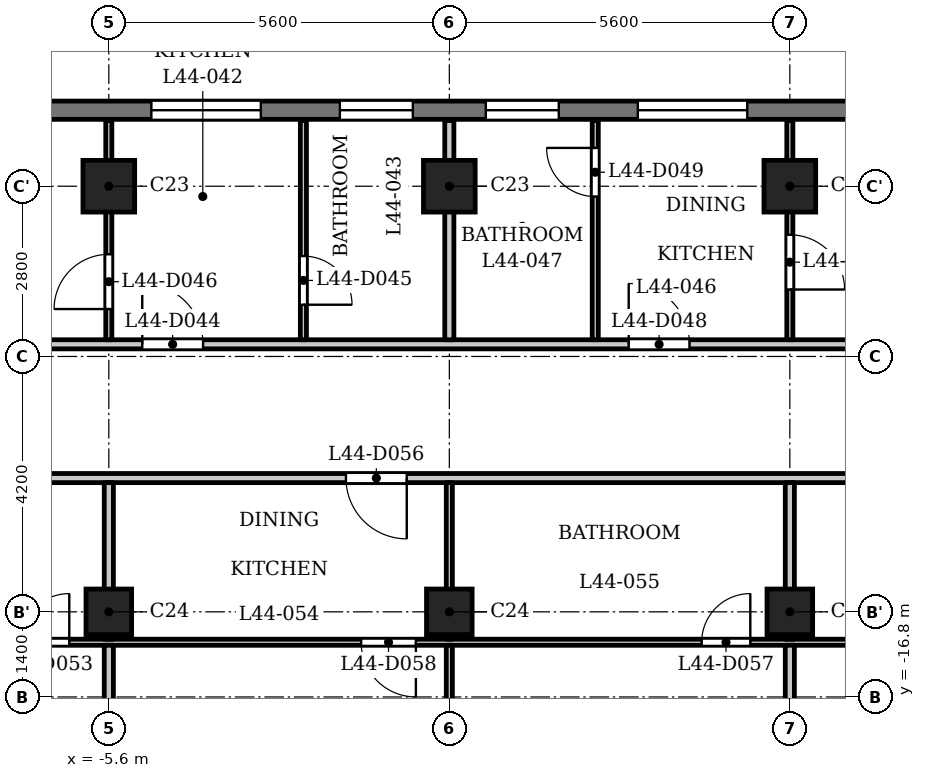
"""IFC4 building model, lengths in metres.
Left out: names, types, materials, properties, quantities, classifications, styles, units other than length and angle.
Written with IfcOpenShell. Run it as: python <this file> out.ifc"""

import sys

from ifc_helpers import new_model, si_unit, direction, frame, frame_2d, origin, origin_2d, place, context, subcontext, project, spatial, rectangle, extrude, element, fill, save


model = new_model("IFC4")
c1 = context("Model", 3, precision=1e-05, world=origin(), true_north=direction((0.0, 1.0)))
c2 = subcontext(c1, "Body", "Model", "MODEL_VIEW")
j1 = project(units=[si_unit("LENGTHUNIT", "METRE"), si_unit("PLANEANGLEUNIT", "RADIAN")], contexts=[c1])
p1 = place(None, origin())
s1 = spatial("IfcSite", under=j1, at=p1, CompositionType="ELEMENT")
p2 = place(p1, origin())
s2 = spatial("IfcBuilding", under=s1, at=p2, CompositionType="ELEMENT")
p3 = place(p2, frame((0.0, 0.0, 171.1)))
s3 = spatial("IfcBuildingStorey", under=s2, at=p3, CompositionType="ELEMENT", Elevation=171.1)
for number, where, z_axis, x_axis in (
    (1, (-5.6, -8.4, 0.0), (0.0, 0.0, 1.0), (1.0, 0.0, 0.0)),
    (2, (0.0, -8.4, 0.0), (0.0, 0.0, 1.0), (1.0, 0.0, 0.0)),
    (3, (5.6, -8.4, 0.0), (0.0, 0.0, 1.0), (1.0, 0.0, 0.0)),
):
    element("IfcColumn", number, at=place(p3, frame(where, z_axis=z_axis, x_axis=x_axis)), inside=s3, PredefinedType="COLUMN", context=c2, shape_type="SweptSolid", body=[
        extrude(rectangle(XDim=0.85, YDim=0.85, at=origin_2d()), origin(), (0.0, 0.0, 1.0), 3.5),
    ])
for number, where, z_axis, x_axis in (
    (4, (-5.6, -15.4, 0.0), (0.0, 0.0, 1.0), (1.0, 0.0, 0.0)),
    (5, (0.0, -15.4, 0.0), (0.0, 0.0, 1.0), (1.0, 0.0, 0.0)),
    (6, (5.6, -15.4, 0.0), (0.0, 0.0, 1.0), (1.0, 0.0, 0.0)),
):
    element("IfcColumn", number, at=place(p3, frame(where, z_axis=z_axis, x_axis=x_axis)), inside=s3, PredefinedType="COLUMN", context=c2, shape_type="SweptSolid", body=[
        extrude(rectangle(XDim=0.75, YDim=0.75, at=origin_2d()), origin(), (0.0, 0.0, 1.0), 3.5),
    ])
p4 = place(p3, frame((13.8, -7.15, 0.0), z_axis=(0.0, 0.0, 1.0), x_axis=(-1.0, 0.0, 0.0)))
e7 = element("IfcWall", 7, at=p4, inside=s3, PredefinedType="SOLIDWALL", context=c2, shape_type="SweptSolid", body=[
    extrude(rectangle(XDim=27.6, YDim=0.3, at=frame_2d((13.8, 0.0))), origin(), (0.0, 0.0, 1.0), 3.2),
])
p5 = place(p4, frame((0.363, 0.0, 0.9)))
e8 = element("IfcOpeningElement", 8, at=p5, cuts=e7, PredefinedType="OPENING", context=c2, shape_type="SweptSolid", body=[
    extrude(rectangle(XDim=1.8, YDim=1.25, at=frame_2d((0.9, 0.625))), frame((0.0, 0.16, 0.0), z_axis=(0.0, -1.0, 0.0), x_axis=(1.0, 0.0, 0.0)), (0.0, 0.0, 1.0), 0.32),
])
p6 = place(p4, frame((3.6, 0.0, 1.2)))
e9 = element("IfcOpeningElement", 9, at=p6, cuts=e7, PredefinedType="OPENING", context=c2, shape_type="SweptSolid", body=[
    extrude(rectangle(XDim=3.6, YDim=0.95, at=frame_2d((1.8, 0.475))), frame((0.0, 0.16, 0.0), z_axis=(0.0, -1.0, 0.0), x_axis=(1.0, 0.0, 0.0)), (0.0, 0.0, 1.0), 0.32),
])
p7 = place(p4, frame((8.9, 0.0, 0.9)))
e10 = element("IfcOpeningElement", 10, at=p7, cuts=e7, PredefinedType="OPENING", context=c2, shape_type="SweptSolid", body=[
    extrude(rectangle(XDim=1.8, YDim=1.25, at=frame_2d((0.9, 0.625))), frame((0.0, 0.16, 0.0), z_axis=(0.0, -1.0, 0.0), x_axis=(1.0, 0.0, 0.0)), (0.0, 0.0, 1.0), 0.32),
])
p8 = place(p4, frame((12.0, 0.0, 0.6)))
e11 = element("IfcOpeningElement", 11, at=p8, cuts=e7, PredefinedType="OPENING", context=c2, shape_type="SweptSolid", body=[
    extrude(rectangle(XDim=1.2, YDim=1.55, at=frame_2d((0.6, 0.775))), frame((0.0, 0.16, 0.0), z_axis=(0.0, -1.0, 0.0), x_axis=(1.0, 0.0, 0.0)), (0.0, 0.0, 1.0), 0.32),
])
p9 = place(p4, frame((14.4, 0.0, 0.6)))
e12 = element("IfcOpeningElement", 12, at=p9, cuts=e7, PredefinedType="OPENING", context=c2, shape_type="SweptSolid", body=[
    extrude(rectangle(XDim=1.2, YDim=1.55, at=frame_2d((0.6, 0.775))), frame((0.0, 0.16, 0.0), z_axis=(0.0, -1.0, 0.0), x_axis=(1.0, 0.0, 0.0)), (0.0, 0.0, 1.0), 0.32),
])
p10 = place(p4, frame((16.9, 0.0, 0.9)))
e13 = element("IfcOpeningElement", 13, at=p10, cuts=e7, PredefinedType="OPENING", context=c2, shape_type="SweptSolid", body=[
    extrude(rectangle(XDim=1.8, YDim=1.25, at=frame_2d((0.9, 0.625))), frame((0.0, 0.16, 0.0), z_axis=(0.0, -1.0, 0.0), x_axis=(1.0, 0.0, 0.0)), (0.0, 0.0, 1.0), 0.32),
])
p11 = place(p4, frame((20.4, 0.0, 1.2)))
e14 = element("IfcOpeningElement", 14, at=p11, cuts=e7, PredefinedType="OPENING", context=c2, shape_type="SweptSolid", body=[
    extrude(rectangle(XDim=3.6, YDim=0.95, at=frame_2d((1.8, 0.475))), frame((0.0, 0.16, 0.0), z_axis=(0.0, -1.0, 0.0), x_axis=(1.0, 0.0, 0.0)), (0.0, 0.0, 1.0), 0.32),
])
p12 = place(p4, frame((25.438, 0.0, 0.9)))
e15 = element("IfcOpeningElement", 15, at=p12, cuts=e7, PredefinedType="OPENING", context=c2, shape_type="SweptSolid", body=[
    extrude(rectangle(XDim=1.8, YDim=1.25, at=frame_2d((0.9, 0.625))), frame((0.0, 0.16, 0.0), z_axis=(0.0, -1.0, 0.0), x_axis=(1.0, 0.0, 0.0)), (0.0, 0.0, 1.0), 0.32),
])
p13 = place(p3, frame((-16.725, -15.9, 0.0), z_axis=(0.0, 0.0, 1.0), x_axis=(1.0, 0.0, 0.0)))
e16 = element("IfcWall", 16, at=p13, inside=s3, PredefinedType="PARTITIONING", context=c2, shape_type="SweptSolid", body=[
    extrude(rectangle(XDim=33.45, YDim=0.1, at=frame_2d((16.725, 0.0))), origin(), (0.0, 0.0, 1.0), 3.2),
])
p14 = place(p13, frame((9.675, 0.0, 0.0)))
e17 = element("IfcOpeningElement", 17, at=p14, cuts=e16, PredefinedType="OPENING", context=c2, shape_type="SweptSolid", body=[
    extrude(rectangle(XDim=0.8, YDim=2.1, at=frame_2d((0.4, 1.05))), frame((0.0, 0.06, 0.0), z_axis=(0.0, -1.0, 0.0), x_axis=(1.0, 0.0, 0.0)), (0.0, 0.0, 1.0), 0.12),
])
p15 = place(p13, frame((4.075, 0.0, 0.0)))
e18 = element("IfcOpeningElement", 18, at=p15, cuts=e16, PredefinedType="OPENING", context=c2, shape_type="SweptSolid", body=[
    extrude(rectangle(XDim=0.9, YDim=2.1, at=frame_2d((0.45, 1.05))), frame((0.0, 0.06, 0.0), z_axis=(0.0, -1.0, 0.0), x_axis=(1.0, 0.0, 0.0)), (0.0, 0.0, 1.0), 0.12),
])
p16 = place(p13, frame((20.875, 0.0, 0.0)))
e19 = element("IfcOpeningElement", 19, at=p16, cuts=e16, PredefinedType="OPENING", context=c2, shape_type="SweptSolid", body=[
    extrude(rectangle(XDim=0.8, YDim=2.1, at=frame_2d((0.4, 1.05))), frame((0.0, 0.06, 0.0), z_axis=(0.0, -1.0, 0.0), x_axis=(1.0, 0.0, 0.0)), (0.0, 0.0, 1.0), 0.12),
])
p17 = place(p13, frame((15.275, 0.0, 0.0)))
e20 = element("IfcOpeningElement", 20, at=p17, cuts=e16, PredefinedType="OPENING", context=c2, shape_type="SweptSolid", body=[
    extrude(rectangle(XDim=0.9, YDim=2.1, at=frame_2d((0.45, 1.05))), frame((0.0, 0.06, 0.0), z_axis=(0.0, -1.0, 0.0), x_axis=(1.0, 0.0, 0.0)), (0.0, 0.0, 1.0), 0.12),
])
p18 = place(p13, frame((30.825, 0.0, 0.0)))
e21 = element("IfcOpeningElement", 21, at=p18, cuts=e16, PredefinedType="OPENING", context=c2, shape_type="SweptSolid", body=[
    extrude(rectangle(XDim=0.8, YDim=2.1, at=frame_2d((0.4, 1.05))), frame((0.0, 0.06, 0.0), z_axis=(0.0, -1.0, 0.0), x_axis=(1.0, 0.0, 0.0)), (0.0, 0.0, 1.0), 0.12),
])
p19 = place(p13, frame((26.475, 0.0, 0.0)))
e22 = element("IfcOpeningElement", 22, at=p19, cuts=e16, PredefinedType="OPENING", context=c2, shape_type="SweptSolid", body=[
    extrude(rectangle(XDim=0.9, YDim=2.1, at=frame_2d((0.45, 1.05))), frame((0.0, 0.06, 0.0), z_axis=(0.0, -1.0, 0.0), x_axis=(1.0, 0.0, 0.0)), (0.0, 0.0, 1.0), 0.12),
])
p20 = place(p3, frame((-17.4, -13.2, 0.0), z_axis=(0.0, 0.0, 1.0), x_axis=(1.0, 0.0, 0.0)))
e23 = element("IfcWall", 23, at=p20, inside=s3, PredefinedType="PARTITIONING", context=c2, shape_type="SweptSolid", body=[
    extrude(rectangle(XDim=34.8, YDim=0.15, at=frame_2d((17.4, 0.0))), origin(), (0.0, 0.0, 1.0), 3.2),
])
p21 = place(p20, frame((0.15, 0.0, 0.0)))
e24 = element("IfcOpeningElement", 24, at=p21, cuts=e23, PredefinedType="OPENING", context=c2, shape_type="SweptSolid", body=[
    extrude(rectangle(XDim=1.0, YDim=2.1, at=frame_2d((0.5, 1.05))), frame((0.0, 0.085, 0.0), z_axis=(0.0, -1.0, 0.0), x_axis=(1.0, 0.0, 0.0)), (0.0, 0.0, 1.0), 0.17),
])
p22 = place(p20, frame((33.55, 0.0, 0.0)))
e25 = element("IfcOpeningElement", 25, at=p22, cuts=e23, PredefinedType="OPENING", context=c2, shape_type="SweptSolid", body=[
    extrude(rectangle(XDim=1.0, YDim=2.1, at=frame_2d((0.5, 1.05))), frame((0.0, 0.085, 0.0), z_axis=(0.0, -1.0, 0.0), x_axis=(1.0, 0.0, 0.0)), (0.0, 0.0, 1.0), 0.17),
])
p23 = place(p20, frame((15.7, 0.0, 0.0)))
e26 = element("IfcOpeningElement", 26, at=p23, cuts=e23, PredefinedType="OPENING", context=c2, shape_type="SweptSolid", body=[
    extrude(rectangle(XDim=1.0, YDim=2.1, at=frame_2d((0.5, 1.05))), frame((0.0, 0.085, 0.0), z_axis=(0.0, -1.0, 0.0), x_axis=(1.0, 0.0, 0.0)), (0.0, 0.0, 1.0), 0.17),
])
p24 = place(p20, frame((26.9, 0.0, 0.0)))
e27 = element("IfcOpeningElement", 27, at=p24, cuts=e23, PredefinedType="OPENING", context=c2, shape_type="SweptSolid", body=[
    extrude(rectangle(XDim=1.0, YDim=2.1, at=frame_2d((0.5, 1.05))), frame((0.0, 0.085, 0.0), z_axis=(0.0, -1.0, 0.0), x_axis=(1.0, 0.0, 0.0)), (0.0, 0.0, 1.0), 0.17),
])
p25 = place(p3, frame((-14.925, -11.0, 0.0), z_axis=(0.0, 0.0, 1.0), x_axis=(1.0, 0.0, 0.0)))
e28 = element("IfcWall", 28, at=p25, inside=s3, PredefinedType="PARTITIONING", context=c2, shape_type="SweptSolid", body=[
    extrude(rectangle(XDim=29.85, YDim=0.15, at=frame_2d((14.925, 0.0))), origin(), (0.0, 0.0, 1.0), 3.2),
])
p26 = place(p25, frame((9.875, 0.0, 0.0)))
e29 = element("IfcOpeningElement", 29, at=p26, cuts=e28, PredefinedType="OPENING", context=c2, shape_type="SweptSolid", body=[
    extrude(rectangle(XDim=1.0, YDim=2.1, at=frame_2d((0.5, 1.05))), frame((0.0, 0.085, 0.0), z_axis=(0.0, -1.0, 0.0), x_axis=(1.0, 0.0, 0.0)), (0.0, 0.0, 1.0), 0.17),
])
p27 = place(p25, frame((17.875, 0.0, 0.0)))
e30 = element("IfcOpeningElement", 30, at=p27, cuts=e28, PredefinedType="OPENING", context=c2, shape_type="SweptSolid", body=[
    extrude(rectangle(XDim=1.0, YDim=2.1, at=frame_2d((0.5, 1.05))), frame((0.0, 0.085, 0.0), z_axis=(0.0, -1.0, 0.0), x_axis=(1.0, 0.0, 0.0)), (0.0, 0.0, 1.0), 0.17),
])
p28 = place(p3, frame((-5.6, -10.925, 0.0), z_axis=(0.0, 0.0, 1.0), x_axis=(0.0, 1.0, 0.0)))
e31 = element("IfcWall", 31, at=p28, inside=s3, PredefinedType="PARTITIONING", context=c2, shape_type="SweptSolid", body=[
    extrude(rectangle(XDim=3.605, YDim=0.1, at=frame_2d((1.802, 0.0))), origin(), (0.0, 0.0, 1.0), 3.2),
])
p29 = place(p28, frame((0.505, 0.0, 0.0)))
e32 = element("IfcOpeningElement", 32, at=p29, cuts=e31, PredefinedType="OPENING", context=c2, shape_type="SweptSolid", body=[
    extrude(rectangle(XDim=0.9, YDim=2.1, at=frame_2d((0.45, 1.05))), frame((0.0, 0.06, 0.0), z_axis=(0.0, -1.0, 0.0), x_axis=(1.0, 0.0, 0.0)), (0.0, 0.0, 1.0), 0.12),
])
p30 = place(p3, frame((-5.6, -22.88, 0.0), z_axis=(0.0, 0.0, 1.0), x_axis=(0.0, 1.0, 0.0)))
e33 = element("IfcWall", 33, at=p30, inside=s3, PredefinedType="PARTITIONING", context=c2, shape_type="SweptSolid", body=[
    extrude(rectangle(XDim=6.93, YDim=0.15, at=frame_2d((3.465, 0.0))), origin(), (0.0, 0.0, 1.0), 3.2),
])
p31 = place(p3, frame((-5.6, -15.85, 0.0), z_axis=(0.0, 0.0, 1.0), x_axis=(0.0, 1.0, 0.0)))
e34 = element("IfcWall", 34, at=p31, inside=s3, PredefinedType="PARTITIONING", context=c2, shape_type="SweptSolid", body=[
    extrude(rectangle(XDim=2.575, YDim=0.15, at=frame_2d((1.288, 0.0))), origin(), (0.0, 0.0, 1.0), 3.2),
])
p32 = place(p3, frame((-2.4, -10.925, 0.0), z_axis=(0.0, 0.0, 1.0), x_axis=(0.0, 1.0, 0.0)))
e35 = element("IfcWall", 35, at=p32, inside=s3, PredefinedType="PARTITIONING", context=c2, shape_type="SweptSolid", body=[
    extrude(rectangle(XDim=3.605, YDim=0.1, at=frame_2d((1.802, 0.0))), origin(), (0.0, 0.0, 1.0), 3.2),
])
p33 = place(p32, frame((0.576, 0.0, 0.0)))
e36 = element("IfcOpeningElement", 36, at=p33, cuts=e35, PredefinedType="OPENING", context=c2, shape_type="SweptSolid", body=[
    extrude(rectangle(XDim=0.8, YDim=2.1, at=frame_2d((0.4, 1.05))), frame((0.0, 0.06, 0.0), z_axis=(0.0, -1.0, 0.0), x_axis=(1.0, 0.0, 0.0)), (0.0, 0.0, 1.0), 0.12),
])
p34 = place(p3, frame((0.0, -22.88, 0.0), z_axis=(0.0, 0.0, 1.0), x_axis=(0.0, 1.0, 0.0)))
e37 = element("IfcWall", 37, at=p34, inside=s3, PredefinedType="PARTITIONING", context=c2, shape_type="SweptSolid", body=[
    extrude(rectangle(XDim=6.93, YDim=0.1, at=frame_2d((3.465, 0.0))), origin(), (0.0, 0.0, 1.0), 3.2),
])
p35 = place(p34, frame((1.22, 0.0, 0.0)))
e38 = element("IfcOpeningElement", 38, at=p35, cuts=e37, PredefinedType="OPENING", context=c2, shape_type="SweptSolid", body=[
    extrude(rectangle(XDim=0.9, YDim=2.1, at=frame_2d((0.45, 1.05))), frame((0.0, 0.06, 0.0), z_axis=(0.0, -1.0, 0.0), x_axis=(1.0, 0.0, 0.0)), (0.0, 0.0, 1.0), 0.12),
])
p36 = place(p3, frame((0.0, -15.85, 0.0), z_axis=(0.0, 0.0, 1.0), x_axis=(0.0, 1.0, 0.0)))
e39 = element("IfcWall", 39, at=p36, inside=s3, PredefinedType="PARTITIONING", context=c2, shape_type="SweptSolid", body=[
    extrude(rectangle(XDim=2.575, YDim=0.1, at=frame_2d((1.288, 0.0))), origin(), (0.0, 0.0, 1.0), 3.2),
])
p37 = place(p3, frame((0.0, -10.925, 0.0), z_axis=(0.0, 0.0, 1.0), x_axis=(0.0, 1.0, 0.0)))
e40 = element("IfcWall", 40, at=p37, inside=s3, PredefinedType="PARTITIONING", context=c2, shape_type="SweptSolid", body=[
    extrude(rectangle(XDim=3.605, YDim=0.15, at=frame_2d((1.802, 0.0))), origin(), (0.0, 0.0, 1.0), 3.2),
])
p38 = place(p3, frame((2.4, -10.925, 0.0), z_axis=(0.0, 0.0, 1.0), x_axis=(0.0, 1.0, 0.0)))
e41 = element("IfcWall", 41, at=p38, inside=s3, PredefinedType="PARTITIONING", context=c2, shape_type="SweptSolid", body=[
    extrude(rectangle(XDim=3.605, YDim=0.1, at=frame_2d((1.802, 0.0))), origin(), (0.0, 0.0, 1.0), 3.2),
])
p39 = place(p38, frame((2.355, 0.0, 0.0)))
e42 = element("IfcOpeningElement", 42, at=p39, cuts=e41, PredefinedType="OPENING", context=c2, shape_type="SweptSolid", body=[
    extrude(rectangle(XDim=0.8, YDim=2.1, at=frame_2d((0.4, 1.05))), frame((0.0, 0.06, 0.0), z_axis=(0.0, -1.0, 0.0), x_axis=(1.0, 0.0, 0.0)), (0.0, 0.0, 1.0), 0.12),
])
p40 = place(p3, frame((5.6, -10.925, 0.0), z_axis=(0.0, 0.0, 1.0), x_axis=(0.0, 1.0, 0.0)))
e43 = element("IfcWall", 43, at=p40, inside=s3, PredefinedType="PARTITIONING", context=c2, shape_type="SweptSolid", body=[
    extrude(rectangle(XDim=3.605, YDim=0.1, at=frame_2d((1.802, 0.0))), origin(), (0.0, 0.0, 1.0), 3.2),
])
p41 = place(p40, frame((0.826, 0.0, 0.0)))
e44 = element("IfcOpeningElement", 44, at=p41, cuts=e43, PredefinedType="OPENING", context=c2, shape_type="SweptSolid", body=[
    extrude(rectangle(XDim=0.9, YDim=2.1, at=frame_2d((0.45, 1.05))), frame((0.0, 0.06, 0.0), z_axis=(0.0, -1.0, 0.0), x_axis=(1.0, 0.0, 0.0)), (0.0, 0.0, 1.0), 0.12),
])
p42 = place(p3, frame((5.6, -22.88, 0.0), z_axis=(0.0, 0.0, 1.0), x_axis=(0.0, 1.0, 0.0)))
e45 = element("IfcWall", 45, at=p42, inside=s3, PredefinedType="PARTITIONING", context=c2, shape_type="SweptSolid", body=[
    extrude(rectangle(XDim=6.93, YDim=0.15, at=frame_2d((3.465, 0.0))), origin(), (0.0, 0.0, 1.0), 3.2),
])
p43 = place(p3, frame((5.6, -15.85, 0.0), z_axis=(0.0, 0.0, 1.0), x_axis=(0.0, 1.0, 0.0)))
e46 = element("IfcWall", 46, at=p43, inside=s3, PredefinedType="PARTITIONING", context=c2, shape_type="SweptSolid", body=[
    extrude(rectangle(XDim=2.575, YDim=0.15, at=frame_2d((1.288, 0.0))), origin(), (0.0, 0.0, 1.0), 3.2),
])
p44 = place(p26, origin())
e47 = element("IfcDoor", 47, at=p44, inside=s3, OperationType="SINGLE_SWING_RIGHT", PredefinedType="DOOR", context=c2, shape_type="SweptSolid", body=[
    extrude(rectangle(XDim=1.0, YDim=2.1, at=frame_2d((0.5, 1.05))), frame((0.0, 0.025, 0.0), z_axis=(0.0, -1.0, 0.0), x_axis=(1.0, 0.0, 0.0)), (0.0, 0.0, 1.0), 0.05),
])
fill(e29, e47)
p45 = place(p33, origin())
e48 = element("IfcDoor", 48, at=p45, inside=s3, OperationType="SINGLE_SWING_LEFT", PredefinedType="DOOR", context=c2, shape_type="SweptSolid", body=[
    extrude(rectangle(XDim=0.8, YDim=2.1, at=frame_2d((0.4, 1.05))), frame((0.0, 0.025, 0.0), z_axis=(0.0, -1.0, 0.0), x_axis=(1.0, 0.0, 0.0)), (0.0, 0.0, 1.0), 0.05),
])
fill(e36, e48)
p46 = place(p29, origin())
e49 = element("IfcDoor", 49, at=p46, inside=s3, OperationType="SINGLE_SWING_RIGHT", PredefinedType="DOOR", context=c2, shape_type="SweptSolid", body=[
    extrude(rectangle(XDim=0.9, YDim=2.1, at=frame_2d((0.45, 1.05))), frame((0.0, 0.025, 0.0), z_axis=(0.0, -1.0, 0.0), x_axis=(1.0, 0.0, 0.0)), (0.0, 0.0, 1.0), 0.05),
])
fill(e32, e49)
p47 = place(p27, origin())
e50 = element("IfcDoor", 50, at=p47, inside=s3, OperationType="SINGLE_SWING_RIGHT", PredefinedType="DOOR", context=c2, shape_type="SweptSolid", body=[
    extrude(rectangle(XDim=1.0, YDim=2.1, at=frame_2d((0.5, 1.05))), frame((0.0, 0.025, 0.0), z_axis=(0.0, -1.0, 0.0), x_axis=(1.0, 0.0, 0.0)), (0.0, 0.0, 1.0), 0.05),
])
fill(e30, e50)
p48 = place(p39, origin())
e51 = element("IfcDoor", 51, at=p48, inside=s3, OperationType="SINGLE_SWING_LEFT", PredefinedType="DOOR", context=c2, shape_type="SweptSolid", body=[
    extrude(rectangle(XDim=0.8, YDim=2.1, at=frame_2d((0.4, 1.05))), frame((0.0, 0.025, 0.0), z_axis=(0.0, -1.0, 0.0), x_axis=(1.0, 0.0, 0.0)), (0.0, 0.0, 1.0), 0.05),
])
fill(e42, e51)
p49 = place(p41, origin())
e52 = element("IfcDoor", 52, at=p49, inside=s3, OperationType="SINGLE_SWING_LEFT", PredefinedType="DOOR", context=c2, shape_type="SweptSolid", body=[
    extrude(rectangle(XDim=0.9, YDim=2.1, at=frame_2d((0.45, 1.05))), frame((0.0, 0.025, 0.0), z_axis=(0.0, -1.0, 0.0), x_axis=(1.0, 0.0, 0.0)), (0.0, 0.0, 1.0), 0.05),
])
fill(e44, e52)
p50 = place(p14, origin())
e53 = element("IfcDoor", 53, at=p50, inside=s3, OperationType="SINGLE_SWING_LEFT", PredefinedType="DOOR", context=c2, shape_type="SweptSolid", body=[
    extrude(rectangle(XDim=0.8, YDim=2.1, at=frame_2d((0.4, 1.05))), frame((0.0, 0.025, 0.0), z_axis=(0.0, -1.0, 0.0), x_axis=(1.0, 0.0, 0.0)), (0.0, 0.0, 1.0), 0.05),
])
fill(e17, e53)
p51 = place(p23, origin())
e54 = element("IfcDoor", 54, at=p51, inside=s3, OperationType="SINGLE_SWING_RIGHT", PredefinedType="DOOR", context=c2, shape_type="SweptSolid", body=[
    extrude(rectangle(XDim=1.0, YDim=2.1, at=frame_2d((0.5, 1.05))), frame((0.0, 0.025, 0.0), z_axis=(0.0, -1.0, 0.0), x_axis=(1.0, 0.0, 0.0)), (0.0, 0.0, 1.0), 0.05),
])
fill(e26, e54)
p52 = place(p16, origin())
e55 = element("IfcDoor", 55, at=p52, inside=s3, OperationType="SINGLE_SWING_LEFT", PredefinedType="DOOR", context=c2, shape_type="SweptSolid", body=[
    extrude(rectangle(XDim=0.8, YDim=2.1, at=frame_2d((0.4, 1.05))), frame((0.0, 0.025, 0.0), z_axis=(0.0, -1.0, 0.0), x_axis=(1.0, 0.0, 0.0)), (0.0, 0.0, 1.0), 0.05),
])
fill(e19, e55)
p53 = place(p17, origin())
e56 = element("IfcDoor", 56, at=p53, inside=s3, OperationType="SINGLE_SWING_RIGHT", PredefinedType="DOOR", context=c2, shape_type="SweptSolid", body=[
    extrude(rectangle(XDim=0.9, YDim=2.1, at=frame_2d((0.45, 1.05))), frame((0.0, 0.025, 0.0), z_axis=(0.0, -1.0, 0.0), x_axis=(1.0, 0.0, 0.0)), (0.0, 0.0, 1.0), 0.05),
])
fill(e20, e56)
p54 = place(p7, origin())
e57 = element("IfcWindow", 57, at=p54, inside=s3, PartitioningType="SINGLE_PANEL", PredefinedType="WINDOW", context=c2, shape_type="SweptSolid", body=[
    extrude(rectangle(XDim=1.8, YDim=1.25, at=frame_2d((0.9, 0.625))), frame((0.0, 0.03, 0.0), z_axis=(0.0, -1.0, 0.0), x_axis=(1.0, 0.0, 0.0)), (0.0, 0.0, 1.0), 0.06),
])
fill(e10, e57)
p55 = place(p8, origin())
e58 = element("IfcWindow", 58, at=p55, inside=s3, PartitioningType="SINGLE_PANEL", PredefinedType="WINDOW", context=c2, shape_type="SweptSolid", body=[
    extrude(rectangle(XDim=1.2, YDim=1.55, at=frame_2d((0.6, 0.775))), frame((0.0, 0.03, 0.0), z_axis=(0.0, -1.0, 0.0), x_axis=(1.0, 0.0, 0.0)), (0.0, 0.0, 1.0), 0.06),
])
fill(e11, e58)
p56 = place(p9, origin())
e59 = element("IfcWindow", 59, at=p56, inside=s3, PartitioningType="SINGLE_PANEL", PredefinedType="WINDOW", context=c2, shape_type="SweptSolid", body=[
    extrude(rectangle(XDim=1.2, YDim=1.55, at=frame_2d((0.6, 0.775))), frame((0.0, 0.03, 0.0), z_axis=(0.0, -1.0, 0.0), x_axis=(1.0, 0.0, 0.0)), (0.0, 0.0, 1.0), 0.06),
])
fill(e12, e59)
p57 = place(p10, origin())
e60 = element("IfcWindow", 60, at=p57, inside=s3, PartitioningType="SINGLE_PANEL", PredefinedType="WINDOW", context=c2, shape_type="SweptSolid", body=[
    extrude(rectangle(XDim=1.8, YDim=1.25, at=frame_2d((0.9, 0.625))), frame((0.0, 0.03, 0.0), z_axis=(0.0, -1.0, 0.0), x_axis=(1.0, 0.0, 0.0)), (0.0, 0.0, 1.0), 0.06),
])
fill(e13, e60)
save(model, sys.argv[1])
